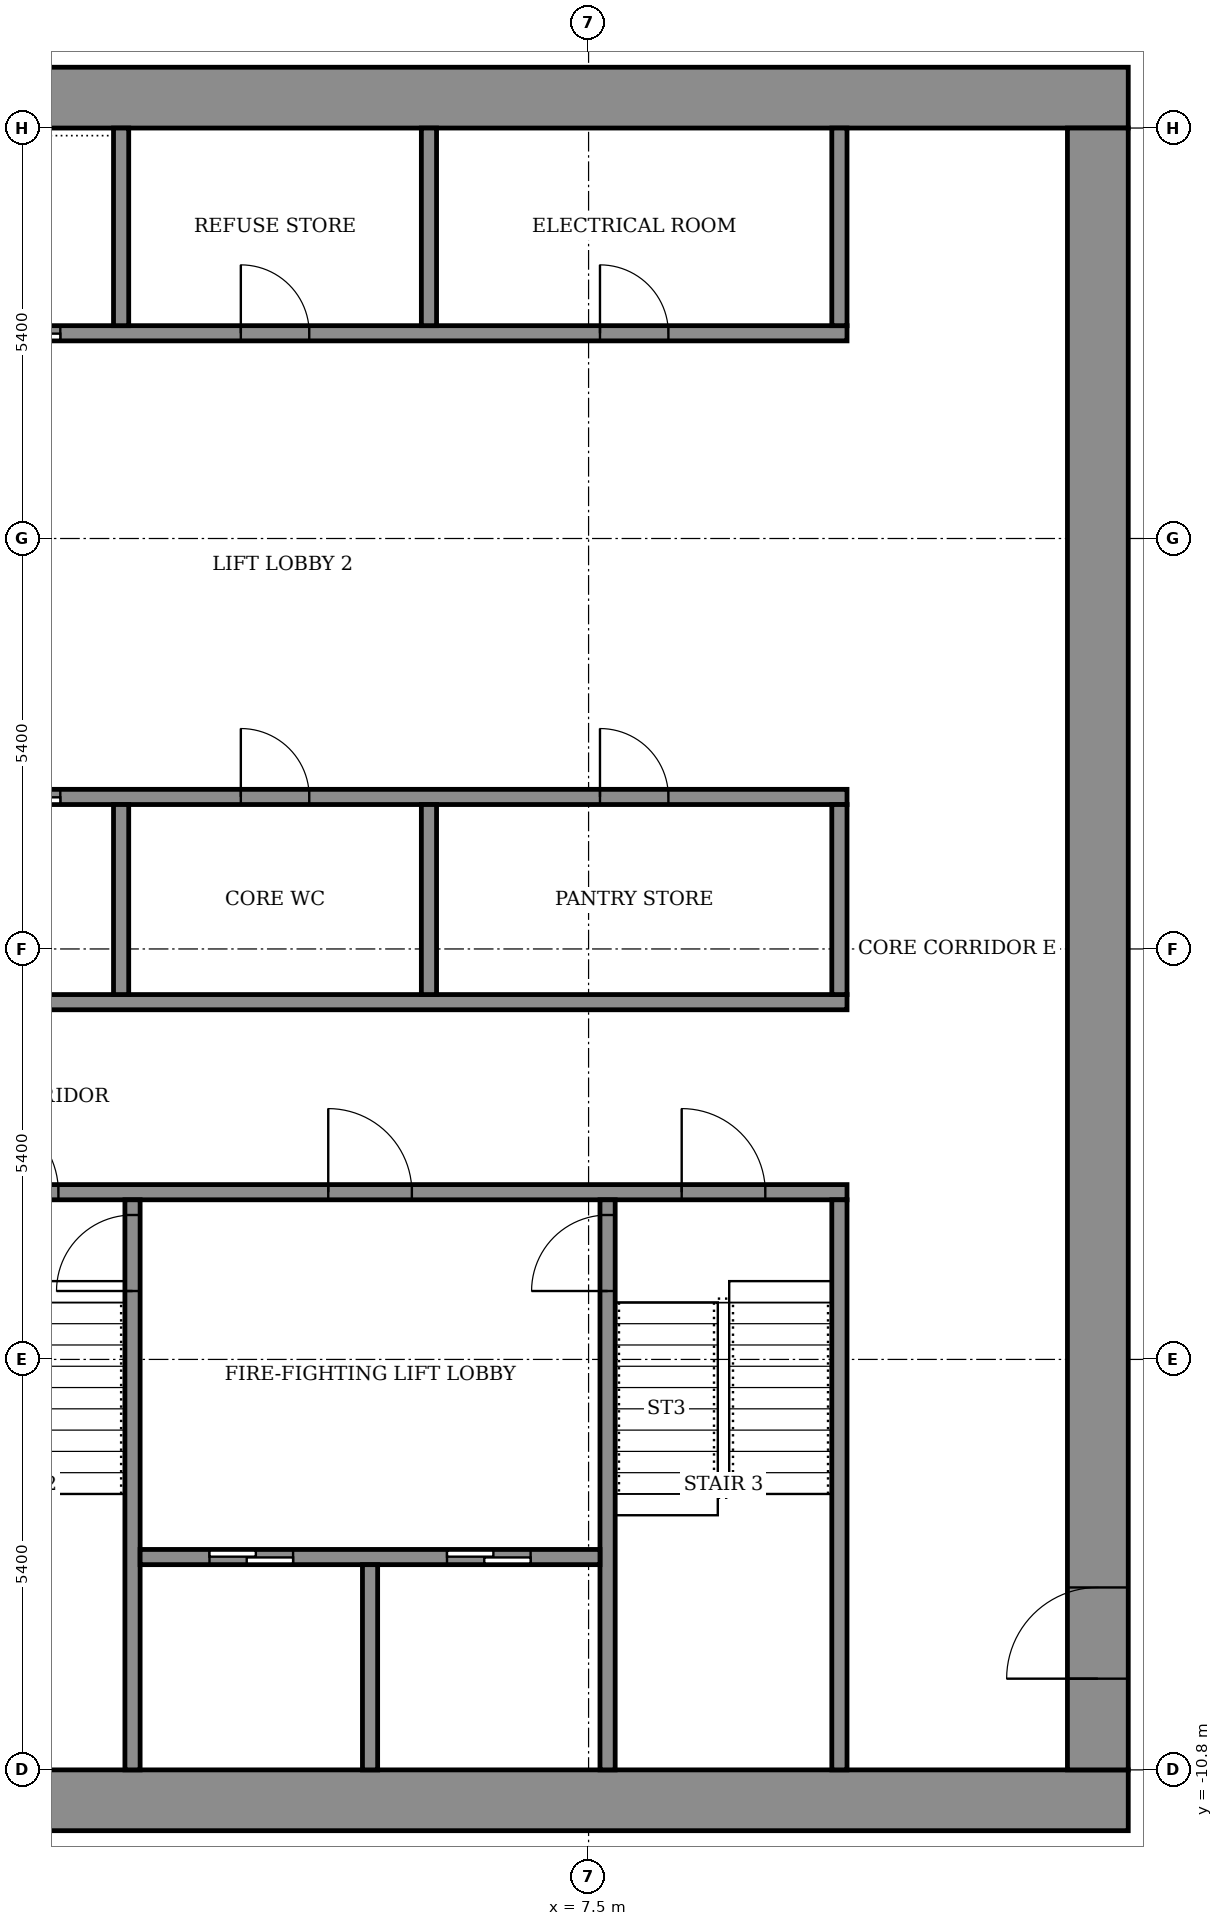
"""IFC4 building model, lengths in metres.
Left out: names, types, materials, properties, quantities, classifications, styles, units other than length and angle.
Written with IfcOpenShell. Run it as: python <this file> out.ifc"""

import sys

from ifc_helpers import new_model, si_unit, direction, frame, frame_2d, origin, place, context, subcontext, project, spatial, rectangle, extrude, element, fill, save


model = new_model("IFC4")
c1 = context("Model", 3, precision=1e-05, world=origin(), true_north=direction((0.0, 1.0)))
c2 = subcontext(c1, "Body", "Model", "MODEL_VIEW")
j1 = project(units=[si_unit("LENGTHUNIT", "METRE"), si_unit("PLANEANGLEUNIT", "RADIAN")], contexts=[c1])
p1 = place(None, origin())
s1 = spatial("IfcSite", under=j1, at=p1, CompositionType="ELEMENT")
p2 = place(p1, origin())
s2 = spatial("IfcBuilding", under=s1, at=p2, CompositionType="ELEMENT")
p3 = place(p2, frame((0.0, 0.0, 238.3)))
s3 = spatial("IfcBuildingStorey", under=s2, at=p3, CompositionType="ELEMENT", Elevation=238.3)
for number, where, z_axis, x_axis in (
    (1, (-14.6, -11.2, 0.0), (0.0, 0.0, 1.0), (1.0, 0.0, 0.0)),
    (2, (-14.6, 11.2, 0.0), (0.0, 0.0, 1.0), (1.0, 0.0, 0.0)),
):
    element("IfcWall", number, at=place(p3, frame(where, z_axis=z_axis, x_axis=x_axis)), inside=s3, PredefinedType="SHEAR", context=c2, shape_type="SweptSolid", body=[
        extrude(rectangle(XDim=29.2, YDim=0.8, at=frame_2d((14.6, 0.0))), origin(), (0.0, 0.0, 1.0), 3.6),
    ])
p4 = place(p3, frame((14.2, -10.8, 0.0), z_axis=(0.0, 0.0, 1.0), x_axis=(0.0, 1.0, 0.0)))
e3 = element("IfcWall", 3, at=p4, inside=s3, PredefinedType="SHEAR", context=c2, shape_type="SweptSolid", body=[
    extrude(rectangle(XDim=21.6, YDim=0.8, at=frame_2d((10.8, 0.0))), origin(), (0.0, 0.0, 1.0), 3.6),
])
p5 = place(p4, frame((1.2, 0.0, 0.0)))
e4 = element("IfcOpeningElement", 4, at=p5, cuts=e3, PredefinedType="OPENING", context=c2, shape_type="SweptSolid", body=[
    extrude(rectangle(XDim=1.2, YDim=2.1, at=frame_2d((0.6, 1.05))), frame((0.0, 0.41, 0.0), z_axis=(0.0, -1.0, 0.0), x_axis=(1.0, 0.0, 0.0)), (0.0, 0.0, 1.0), 0.82),
])
p6 = place(p3, frame((-10.9, -3.2, 0.0), z_axis=(0.0, 0.0, 1.0), x_axis=(1.0, 0.0, 0.0)))
e5 = element("IfcWall", 5, at=p6, inside=s3, PredefinedType="SHEAR", context=c2, shape_type="SweptSolid", body=[
    extrude(rectangle(XDim=21.8, YDim=0.2, at=frame_2d((10.9, 0.0))), origin(), (0.0, 0.0, 1.0), 3.05),
])
p7 = place(p6, frame((1.075, 0.0, 0.0)))
e6 = element("IfcOpeningElement", 6, at=p7, cuts=e5, PredefinedType="OPENING", context=c2, shape_type="SweptSolid", body=[
    extrude(rectangle(XDim=1.1, YDim=2.1, at=frame_2d((0.55, 1.05))), frame((0.0, 0.11, 0.0), z_axis=(0.0, -1.0, 0.0), x_axis=(1.0, 0.0, 0.0)), (0.0, 0.0, 1.0), 0.22),
])
p8 = place(p6, frame((10.325, 0.0, 0.0)))
e7 = element("IfcOpeningElement", 7, at=p8, cuts=e5, PredefinedType="OPENING", context=c2, shape_type="SweptSolid", body=[
    extrude(rectangle(XDim=1.1, YDim=2.1, at=frame_2d((0.55, 1.05))), frame((0.0, 0.11, 0.0), z_axis=(0.0, -1.0, 0.0), x_axis=(1.0, 0.0, 0.0)), (0.0, 0.0, 1.0), 0.22),
])
p9 = place(p6, frame((19.625, 0.0, 0.0)))
e8 = element("IfcOpeningElement", 8, at=p9, cuts=e5, PredefinedType="OPENING", context=c2, shape_type="SweptSolid", body=[
    extrude(rectangle(XDim=1.1, YDim=2.1, at=frame_2d((0.55, 1.05))), frame((0.0, 0.11, 0.0), z_axis=(0.0, -1.0, 0.0), x_axis=(1.0, 0.0, 0.0)), (0.0, 0.0, 1.0), 0.22),
])
p10 = place(p6, frame((5.7, 0.0, 0.0)))
e9 = element("IfcOpeningElement", 9, at=p10, cuts=e5, PredefinedType="OPENING", context=c2, shape_type="SweptSolid", body=[
    extrude(rectangle(XDim=1.1, YDim=2.1, at=frame_2d((0.55, 1.05))), frame((0.0, 0.11, 0.0), z_axis=(0.0, -1.0, 0.0), x_axis=(1.0, 0.0, 0.0)), (0.0, 0.0, 1.0), 0.22),
])
p11 = place(p6, frame((14.975, 0.0, 0.0)))
e10 = element("IfcOpeningElement", 10, at=p11, cuts=e5, PredefinedType="OPENING", context=c2, shape_type="SweptSolid", body=[
    extrude(rectangle(XDim=1.1, YDim=2.1, at=frame_2d((0.55, 1.05))), frame((0.0, 0.11, 0.0), z_axis=(0.0, -1.0, 0.0), x_axis=(1.0, 0.0, 0.0)), (0.0, 0.0, 1.0), 0.22),
])
p12 = place(p3, frame((-10.9, -0.7, 0.0), z_axis=(0.0, 0.0, 1.0), x_axis=(1.0, 0.0, 0.0)))
e11 = element("IfcWall", 11, at=p12, inside=s3, PredefinedType="SHEAR", context=c2, shape_type="SweptSolid", body=[
    extrude(rectangle(XDim=21.8, YDim=0.2, at=frame_2d((10.9, 0.0))), origin(), (0.0, 0.0, 1.0), 3.05),
])
p13 = place(p3, frame((-10.9, 2.0, 0.0), z_axis=(0.0, 0.0, 1.0), x_axis=(1.0, 0.0, 0.0)))
e12 = element("IfcWall", 12, at=p13, inside=s3, PredefinedType="SHEAR", context=c2, shape_type="SweptSolid", body=[
    extrude(rectangle(XDim=21.8, YDim=0.2, at=frame_2d((10.9, 0.0))), origin(), (0.0, 0.0, 1.0), 3.05),
])
p14 = place(p13, frame((4.95, 0.0, 0.0)))
e13 = element("IfcOpeningElement", 13, at=p14, cuts=e12, PredefinedType="OPENING", context=c2, shape_type="SweptSolid", body=[
    extrude(rectangle(XDim=1.1, YDim=2.1, at=frame_2d((0.55, 1.05))), frame((0.0, 0.11, 0.0), z_axis=(0.0, -1.0, 0.0), x_axis=(1.0, 0.0, 0.0)), (0.0, 0.0, 1.0), 0.22),
])
p15 = place(p13, frame((7.65, 0.0, 0.0)))
e14 = element("IfcOpeningElement", 14, at=p15, cuts=e12, PredefinedType="OPENING", context=c2, shape_type="SweptSolid", body=[
    extrude(rectangle(XDim=1.1, YDim=2.1, at=frame_2d((0.55, 1.05))), frame((0.0, 0.11, 0.0), z_axis=(0.0, -1.0, 0.0), x_axis=(1.0, 0.0, 0.0)), (0.0, 0.0, 1.0), 0.22),
])
p16 = place(p13, frame((10.35, 0.0, 0.0)))
e15 = element("IfcOpeningElement", 15, at=p16, cuts=e12, PredefinedType="OPENING", context=c2, shape_type="SweptSolid", body=[
    extrude(rectangle(XDim=1.1, YDim=2.1, at=frame_2d((0.55, 1.05))), frame((0.0, 0.11, 0.0), z_axis=(0.0, -1.0, 0.0), x_axis=(1.0, 0.0, 0.0)), (0.0, 0.0, 1.0), 0.22),
])
p17 = place(p13, frame((1.675, 0.0, 0.0)))
e16 = element("IfcOpeningElement", 16, at=p17, cuts=e12, PredefinedType="OPENING", context=c2, shape_type="SweptSolid", body=[
    extrude(rectangle(XDim=0.9, YDim=2.1, at=frame_2d((0.45, 1.05))), frame((0.0, 0.11, 0.0), z_axis=(0.0, -1.0, 0.0), x_axis=(1.0, 0.0, 0.0)), (0.0, 0.0, 1.0), 0.22),
])
p18 = place(p13, frame((13.825, 0.0, 0.0)))
e17 = element("IfcOpeningElement", 17, at=p18, cuts=e12, PredefinedType="OPENING", context=c2, shape_type="SweptSolid", body=[
    extrude(rectangle(XDim=0.9, YDim=2.1, at=frame_2d((0.45, 1.05))), frame((0.0, 0.11, 0.0), z_axis=(0.0, -1.0, 0.0), x_axis=(1.0, 0.0, 0.0)), (0.0, 0.0, 1.0), 0.22),
])
p19 = place(p13, frame((18.55, 0.0, 0.0)))
e18 = element("IfcOpeningElement", 18, at=p19, cuts=e12, PredefinedType="OPENING", context=c2, shape_type="SweptSolid", body=[
    extrude(rectangle(XDim=0.9, YDim=2.1, at=frame_2d((0.45, 1.05))), frame((0.0, 0.11, 0.0), z_axis=(0.0, -1.0, 0.0), x_axis=(1.0, 0.0, 0.0)), (0.0, 0.0, 1.0), 0.22),
])
p20 = place(p3, frame((-10.9, 8.1, 0.0), z_axis=(0.0, 0.0, 1.0), x_axis=(1.0, 0.0, 0.0)))
e19 = element("IfcWall", 19, at=p20, inside=s3, PredefinedType="SHEAR", context=c2, shape_type="SweptSolid", body=[
    extrude(rectangle(XDim=21.8, YDim=0.2, at=frame_2d((10.9, 0.0))), origin(), (0.0, 0.0, 1.0), 3.05),
])
p21 = place(p20, frame((4.95, 0.0, 0.0)))
e20 = element("IfcOpeningElement", 20, at=p21, cuts=e19, PredefinedType="OPENING", context=c2, shape_type="SweptSolid", body=[
    extrude(rectangle(XDim=1.1, YDim=2.1, at=frame_2d((0.55, 1.05))), frame((0.0, 0.11, 0.0), z_axis=(0.0, -1.0, 0.0), x_axis=(1.0, 0.0, 0.0)), (0.0, 0.0, 1.0), 0.22),
])
p22 = place(p20, frame((7.65, 0.0, 0.0)))
e21 = element("IfcOpeningElement", 21, at=p22, cuts=e19, PredefinedType="OPENING", context=c2, shape_type="SweptSolid", body=[
    extrude(rectangle(XDim=1.1, YDim=2.1, at=frame_2d((0.55, 1.05))), frame((0.0, 0.11, 0.0), z_axis=(0.0, -1.0, 0.0), x_axis=(1.0, 0.0, 0.0)), (0.0, 0.0, 1.0), 0.22),
])
p23 = place(p20, frame((10.35, 0.0, 0.0)))
e22 = element("IfcOpeningElement", 22, at=p23, cuts=e19, PredefinedType="OPENING", context=c2, shape_type="SweptSolid", body=[
    extrude(rectangle(XDim=1.1, YDim=2.1, at=frame_2d((0.55, 1.05))), frame((0.0, 0.11, 0.0), z_axis=(0.0, -1.0, 0.0), x_axis=(1.0, 0.0, 0.0)), (0.0, 0.0, 1.0), 0.22),
])
p24 = place(p20, frame((1.675, 0.0, 0.0)))
e23 = element("IfcOpeningElement", 23, at=p24, cuts=e19, PredefinedType="OPENING", context=c2, shape_type="SweptSolid", body=[
    extrude(rectangle(XDim=0.9, YDim=2.1, at=frame_2d((0.45, 1.05))), frame((0.0, 0.11, 0.0), z_axis=(0.0, -1.0, 0.0), x_axis=(1.0, 0.0, 0.0)), (0.0, 0.0, 1.0), 0.22),
])
p25 = place(p20, frame((13.825, 0.0, 0.0)))
e24 = element("IfcOpeningElement", 24, at=p25, cuts=e19, PredefinedType="OPENING", context=c2, shape_type="SweptSolid", body=[
    extrude(rectangle(XDim=0.9, YDim=2.1, at=frame_2d((0.45, 1.05))), frame((0.0, 0.11, 0.0), z_axis=(0.0, -1.0, 0.0), x_axis=(1.0, 0.0, 0.0)), (0.0, 0.0, 1.0), 0.22),
])
p26 = place(p20, frame((18.55, 0.0, 0.0)))
e25 = element("IfcOpeningElement", 25, at=p26, cuts=e19, PredefinedType="OPENING", context=c2, shape_type="SweptSolid", body=[
    extrude(rectangle(XDim=0.9, YDim=2.1, at=frame_2d((0.45, 1.05))), frame((0.0, 0.11, 0.0), z_axis=(0.0, -1.0, 0.0), x_axis=(1.0, 0.0, 0.0)), (0.0, 0.0, 1.0), 0.22),
])
p27 = place(p3, frame((1.5, -10.8, 0.0), z_axis=(0.0, 0.0, 1.0), x_axis=(0.0, 1.0, 0.0)))
e26 = element("IfcWall", 26, at=p27, inside=s3, PredefinedType="SHEAR", context=c2, shape_type="SweptSolid", body=[
    extrude(rectangle(XDim=7.5, YDim=0.2, at=frame_2d((3.75, 0.0))), origin(), (0.0, 0.0, 1.0), 3.05),
])
p28 = place(p27, frame((6.3, 0.0, 0.0)))
e27 = element("IfcOpeningElement", 27, at=p28, cuts=e26, PredefinedType="OPENING", context=c2, shape_type="SweptSolid", body=[
    extrude(rectangle(XDim=1.0, YDim=2.1, at=frame_2d((0.5, 1.05))), frame((0.0, 0.11, 0.0), z_axis=(0.0, -1.0, 0.0), x_axis=(1.0, 0.0, 0.0)), (0.0, 0.0, 1.0), 0.22),
])
p29 = place(p3, frame((7.75, -10.8, 0.0), z_axis=(0.0, 0.0, 1.0), x_axis=(0.0, 1.0, 0.0)))
e28 = element("IfcWall", 28, at=p29, inside=s3, PredefinedType="SHEAR", context=c2, shape_type="SweptSolid", body=[
    extrude(rectangle(XDim=7.5, YDim=0.2, at=frame_2d((3.75, 0.0))), origin(), (0.0, 0.0, 1.0), 3.05),
])
p30 = place(p29, frame((6.3, 0.0, 0.0)))
e29 = element("IfcOpeningElement", 29, at=p30, cuts=e28, PredefinedType="OPENING", context=c2, shape_type="SweptSolid", body=[
    extrude(rectangle(XDim=1.0, YDim=2.1, at=frame_2d((0.5, 1.05))), frame((0.0, 0.11, 0.0), z_axis=(0.0, -1.0, 0.0), x_axis=(1.0, 0.0, 0.0)), (0.0, 0.0, 1.0), 0.22),
])
p31 = place(p3, frame((10.8, -10.8, 0.0), z_axis=(0.0, 0.0, 1.0), x_axis=(0.0, 1.0, 0.0)))
e30 = element("IfcWall", 30, at=p31, inside=s3, PredefinedType="SHEAR", context=c2, shape_type="SweptSolid", body=[
    extrude(rectangle(XDim=7.5, YDim=0.2, at=frame_2d((3.75, 0.0))), origin(), (0.0, 0.0, 1.0), 3.05),
])
p32 = place(p3, frame((1.6, -8.0, 0.0), z_axis=(0.0, 0.0, 1.0), x_axis=(1.0, 0.0, 0.0)))
e31 = element("IfcWall", 31, at=p32, inside=s3, PredefinedType="SHEAR", context=c2, shape_type="SweptSolid", body=[
    extrude(rectangle(XDim=6.05, YDim=0.2, at=frame_2d((3.025, 0.0))), origin(), (0.0, 0.0, 1.0), 3.05),
])
p33 = place(p32, frame((0.913, 0.0, 0.0)))
e32 = element("IfcOpeningElement", 32, at=p33, cuts=e31, PredefinedType="OPENING", context=c2, shape_type="SweptSolid", body=[
    extrude(rectangle(XDim=1.1, YDim=2.1, at=frame_2d((0.55, 1.05))), frame((0.0, 0.11, 0.0), z_axis=(0.0, -1.0, 0.0), x_axis=(1.0, 0.0, 0.0)), (0.0, 0.0, 1.0), 0.22),
])
p34 = place(p32, frame((4.038, 0.0, 0.0)))
e33 = element("IfcOpeningElement", 33, at=p34, cuts=e31, PredefinedType="OPENING", context=c2, shape_type="SweptSolid", body=[
    extrude(rectangle(XDim=1.1, YDim=2.1, at=frame_2d((0.55, 1.05))), frame((0.0, 0.11, 0.0), z_axis=(0.0, -1.0, 0.0), x_axis=(1.0, 0.0, 0.0)), (0.0, 0.0, 1.0), 0.22),
])
p35 = place(p3, frame((4.625, -10.8, 0.0), z_axis=(0.0, 0.0, 1.0), x_axis=(0.0, 1.0, 0.0)))
e34 = element("IfcWall", 34, at=p35, inside=s3, PredefinedType="SHEAR", context=c2, shape_type="SweptSolid", body=[
    extrude(rectangle(XDim=2.7, YDim=0.2, at=frame_2d((1.35, 0.0))), origin(), (0.0, 0.0, 1.0), 3.05),
])
p36 = place(p3, frame((1.35, -0.6, 0.0), z_axis=(0.0, 0.0, 1.0), x_axis=(0.0, 1.0, 0.0)))
e35 = element("IfcWall", 35, at=p36, inside=s3, PredefinedType="SHEAR", context=c2, shape_type="SweptSolid", body=[
    extrude(rectangle(XDim=2.5, YDim=0.2, at=frame_2d((1.25, 0.0))), origin(), (0.0, 0.0, 1.0), 3.05),
])
for number, where, z_axis, x_axis in (
    (36, (5.4, -0.6, 0.0), (0.0, 0.0, 1.0), (0.0, 1.0, 0.0)),
    (37, (10.8, -0.6, 0.0), (0.0, 0.0, 1.0), (0.0, 1.0, 0.0)),
):
    element("IfcWall", number, at=place(p3, frame(where, z_axis=z_axis, x_axis=x_axis)), inside=s3, PredefinedType="STANDARD", context=c2, shape_type="SweptSolid", body=[
        extrude(rectangle(XDim=2.5, YDim=0.2, at=frame_2d((1.25, 0.0))), origin(), (0.0, 0.0, 1.0), 3.05),
    ])
p37 = place(p3, frame((1.35, 8.2, 0.0), z_axis=(0.0, 0.0, 1.0), x_axis=(0.0, 1.0, 0.0)))
e38 = element("IfcWall", 38, at=p37, inside=s3, PredefinedType="SHEAR", context=c2, shape_type="SweptSolid", body=[
    extrude(rectangle(XDim=2.6, YDim=0.2, at=frame_2d((1.3, 0.0))), origin(), (0.0, 0.0, 1.0), 3.05),
])
for number, where, z_axis, x_axis in (
    (39, (5.4, 8.2, 0.0), (0.0, 0.0, 1.0), (0.0, 1.0, 0.0)),
    (40, (10.8, 8.2, 0.0), (0.0, 0.0, 1.0), (0.0, 1.0, 0.0)),
):
    element("IfcWall", number, at=place(p3, frame(where, z_axis=z_axis, x_axis=x_axis)), inside=s3, PredefinedType="STANDARD", context=c2, shape_type="SweptSolid", body=[
        extrude(rectangle(XDim=2.6, YDim=0.2, at=frame_2d((1.3, 0.0))), origin(), (0.0, 0.0, 1.0), 3.05),
    ])
p38 = place(p5, origin())
e41 = element("IfcDoor", 41, at=p38, inside=s3, OperationType="DOUBLE_DOOR_SINGLE_SWING", PredefinedType="DOOR", context=c2, shape_type="SweptSolid", body=[
    extrude(rectangle(XDim=1.2, YDim=2.1, at=frame_2d((0.6, 1.05))), frame((0.0, 0.025, 0.0), z_axis=(0.0, -1.0, 0.0), x_axis=(1.0, 0.0, 0.0)), (0.0, 0.0, 1.0), 0.05),
])
fill(e4, e41)
p39 = place(p16, origin())
e42 = element("IfcDoor", 42, at=p39, inside=s3, OperationType="SLIDING_TO_LEFT", PredefinedType="DOOR", context=c2, shape_type="SweptSolid", body=[
    extrude(rectangle(XDim=1.1, YDim=2.1, at=frame_2d((0.55, 1.05))), frame((0.0, 0.025, 0.0), z_axis=(0.0, -1.0, 0.0), x_axis=(1.0, 0.0, 0.0)), (0.0, 0.0, 1.0), 0.05),
])
fill(e15, e42)
p40 = place(p23, origin())
e43 = element("IfcDoor", 43, at=p40, inside=s3, OperationType="SLIDING_TO_LEFT", PredefinedType="DOOR", context=c2, shape_type="SweptSolid", body=[
    extrude(rectangle(XDim=1.1, YDim=2.1, at=frame_2d((0.55, 1.05))), frame((0.0, 0.025, 0.0), z_axis=(0.0, -1.0, 0.0), x_axis=(1.0, 0.0, 0.0)), (0.0, 0.0, 1.0), 0.05),
])
fill(e22, e43)
p41 = place(p18, origin())
e44 = element("IfcDoor", 44, at=p41, inside=s3, OperationType="SINGLE_SWING_RIGHT", PredefinedType="DOOR", context=c2, shape_type="SweptSolid", body=[
    extrude(rectangle(XDim=0.9, YDim=2.1, at=frame_2d((0.45, 1.05))), frame((0.0, 0.025, 0.0), z_axis=(0.0, -1.0, 0.0), x_axis=(1.0, 0.0, 0.0)), (0.0, 0.0, 1.0), 0.05),
])
fill(e17, e44)
p42 = place(p19, origin())
e45 = element("IfcDoor", 45, at=p42, inside=s3, OperationType="SINGLE_SWING_RIGHT", PredefinedType="DOOR", context=c2, shape_type="SweptSolid", body=[
    extrude(rectangle(XDim=0.9, YDim=2.1, at=frame_2d((0.45, 1.05))), frame((0.0, 0.025, 0.0), z_axis=(0.0, -1.0, 0.0), x_axis=(1.0, 0.0, 0.0)), (0.0, 0.0, 1.0), 0.05),
])
fill(e18, e45)
p43 = place(p25, origin())
e46 = element("IfcDoor", 46, at=p43, inside=s3, OperationType="SINGLE_SWING_RIGHT", PredefinedType="DOOR", context=c2, shape_type="SweptSolid", body=[
    extrude(rectangle(XDim=0.9, YDim=2.1, at=frame_2d((0.45, 1.05))), frame((0.0, 0.025, 0.0), z_axis=(0.0, -1.0, 0.0), x_axis=(1.0, 0.0, 0.0)), (0.0, 0.0, 1.0), 0.05),
])
fill(e24, e46)
p44 = place(p26, origin())
e47 = element("IfcDoor", 47, at=p44, inside=s3, OperationType="SINGLE_SWING_LEFT", PredefinedType="DOOR", context=c2, shape_type="SweptSolid", body=[
    extrude(rectangle(XDim=0.9, YDim=2.1, at=frame_2d((0.45, 1.05))), frame((0.0, 0.025, 0.0), z_axis=(0.0, -1.0, 0.0), x_axis=(1.0, 0.0, 0.0)), (0.0, 0.0, 1.0), 0.05),
])
fill(e25, e47)
p45 = place(p33, origin())
e48 = element("IfcDoor", 48, at=p45, inside=s3, OperationType="SLIDING_TO_LEFT", PredefinedType="DOOR", context=c2, shape_type="SweptSolid", body=[
    extrude(rectangle(XDim=1.1, YDim=2.1, at=frame_2d((0.55, 1.05))), frame((0.0, 0.025, 0.0), z_axis=(0.0, -1.0, 0.0), x_axis=(1.0, 0.0, 0.0)), (0.0, 0.0, 1.0), 0.05),
])
fill(e32, e48)
p46 = place(p34, origin())
e49 = element("IfcDoor", 49, at=p46, inside=s3, OperationType="SLIDING_TO_LEFT", PredefinedType="DOOR", context=c2, shape_type="SweptSolid", body=[
    extrude(rectangle(XDim=1.1, YDim=2.1, at=frame_2d((0.55, 1.05))), frame((0.0, 0.025, 0.0), z_axis=(0.0, -1.0, 0.0), x_axis=(1.0, 0.0, 0.0)), (0.0, 0.0, 1.0), 0.05),
])
fill(e33, e49)
p47 = place(p8, origin())
e50 = element("IfcDoor", 50, at=p47, inside=s3, OperationType="SINGLE_SWING_RIGHT", PredefinedType="DOOR", context=c2, shape_type="SweptSolid", body=[
    extrude(rectangle(XDim=1.1, YDim=2.1, at=frame_2d((0.55, 1.05))), frame((0.0, 0.025, 0.0), z_axis=(0.0, -1.0, 0.0), x_axis=(1.0, 0.0, 0.0)), (0.0, 0.0, 1.0), 0.05),
])
fill(e7, e50)
p48 = place(p9, origin())
e51 = element("IfcDoor", 51, at=p48, inside=s3, OperationType="SINGLE_SWING_RIGHT", PredefinedType="DOOR", context=c2, shape_type="SweptSolid", body=[
    extrude(rectangle(XDim=1.1, YDim=2.1, at=frame_2d((0.55, 1.05))), frame((0.0, 0.025, 0.0), z_axis=(0.0, -1.0, 0.0), x_axis=(1.0, 0.0, 0.0)), (0.0, 0.0, 1.0), 0.05),
])
fill(e8, e51)
p49 = place(p11, origin())
e52 = element("IfcDoor", 52, at=p49, inside=s3, OperationType="SINGLE_SWING_LEFT", PredefinedType="DOOR", context=c2, shape_type="SweptSolid", body=[
    extrude(rectangle(XDim=1.1, YDim=2.1, at=frame_2d((0.55, 1.05))), frame((0.0, 0.025, 0.0), z_axis=(0.0, -1.0, 0.0), x_axis=(1.0, 0.0, 0.0)), (0.0, 0.0, 1.0), 0.05),
])
fill(e10, e52)
p50 = place(p28, origin())
e53 = element("IfcDoor", 53, at=p50, inside=s3, OperationType="SINGLE_SWING_RIGHT", PredefinedType="DOOR", context=c2, shape_type="SweptSolid", body=[
    extrude(rectangle(XDim=1.0, YDim=2.1, at=frame_2d((0.5, 1.05))), frame((0.0, 0.025, 0.0), z_axis=(0.0, -1.0, 0.0), x_axis=(1.0, 0.0, 0.0)), (0.0, 0.0, 1.0), 0.05),
])
fill(e27, e53)
p51 = place(p30, origin())
e54 = element("IfcDoor", 54, at=p51, inside=s3, OperationType="SINGLE_SWING_RIGHT", PredefinedType="DOOR", context=c2, shape_type="SweptSolid", body=[
    extrude(rectangle(XDim=1.0, YDim=2.1, at=frame_2d((0.5, 1.05))), frame((0.0, 0.025, 0.0), z_axis=(0.0, -1.0, 0.0), x_axis=(1.0, 0.0, 0.0)), (0.0, 0.0, 1.0), 0.05),
])
fill(e29, e54)
save(model, sys.argv[1])
